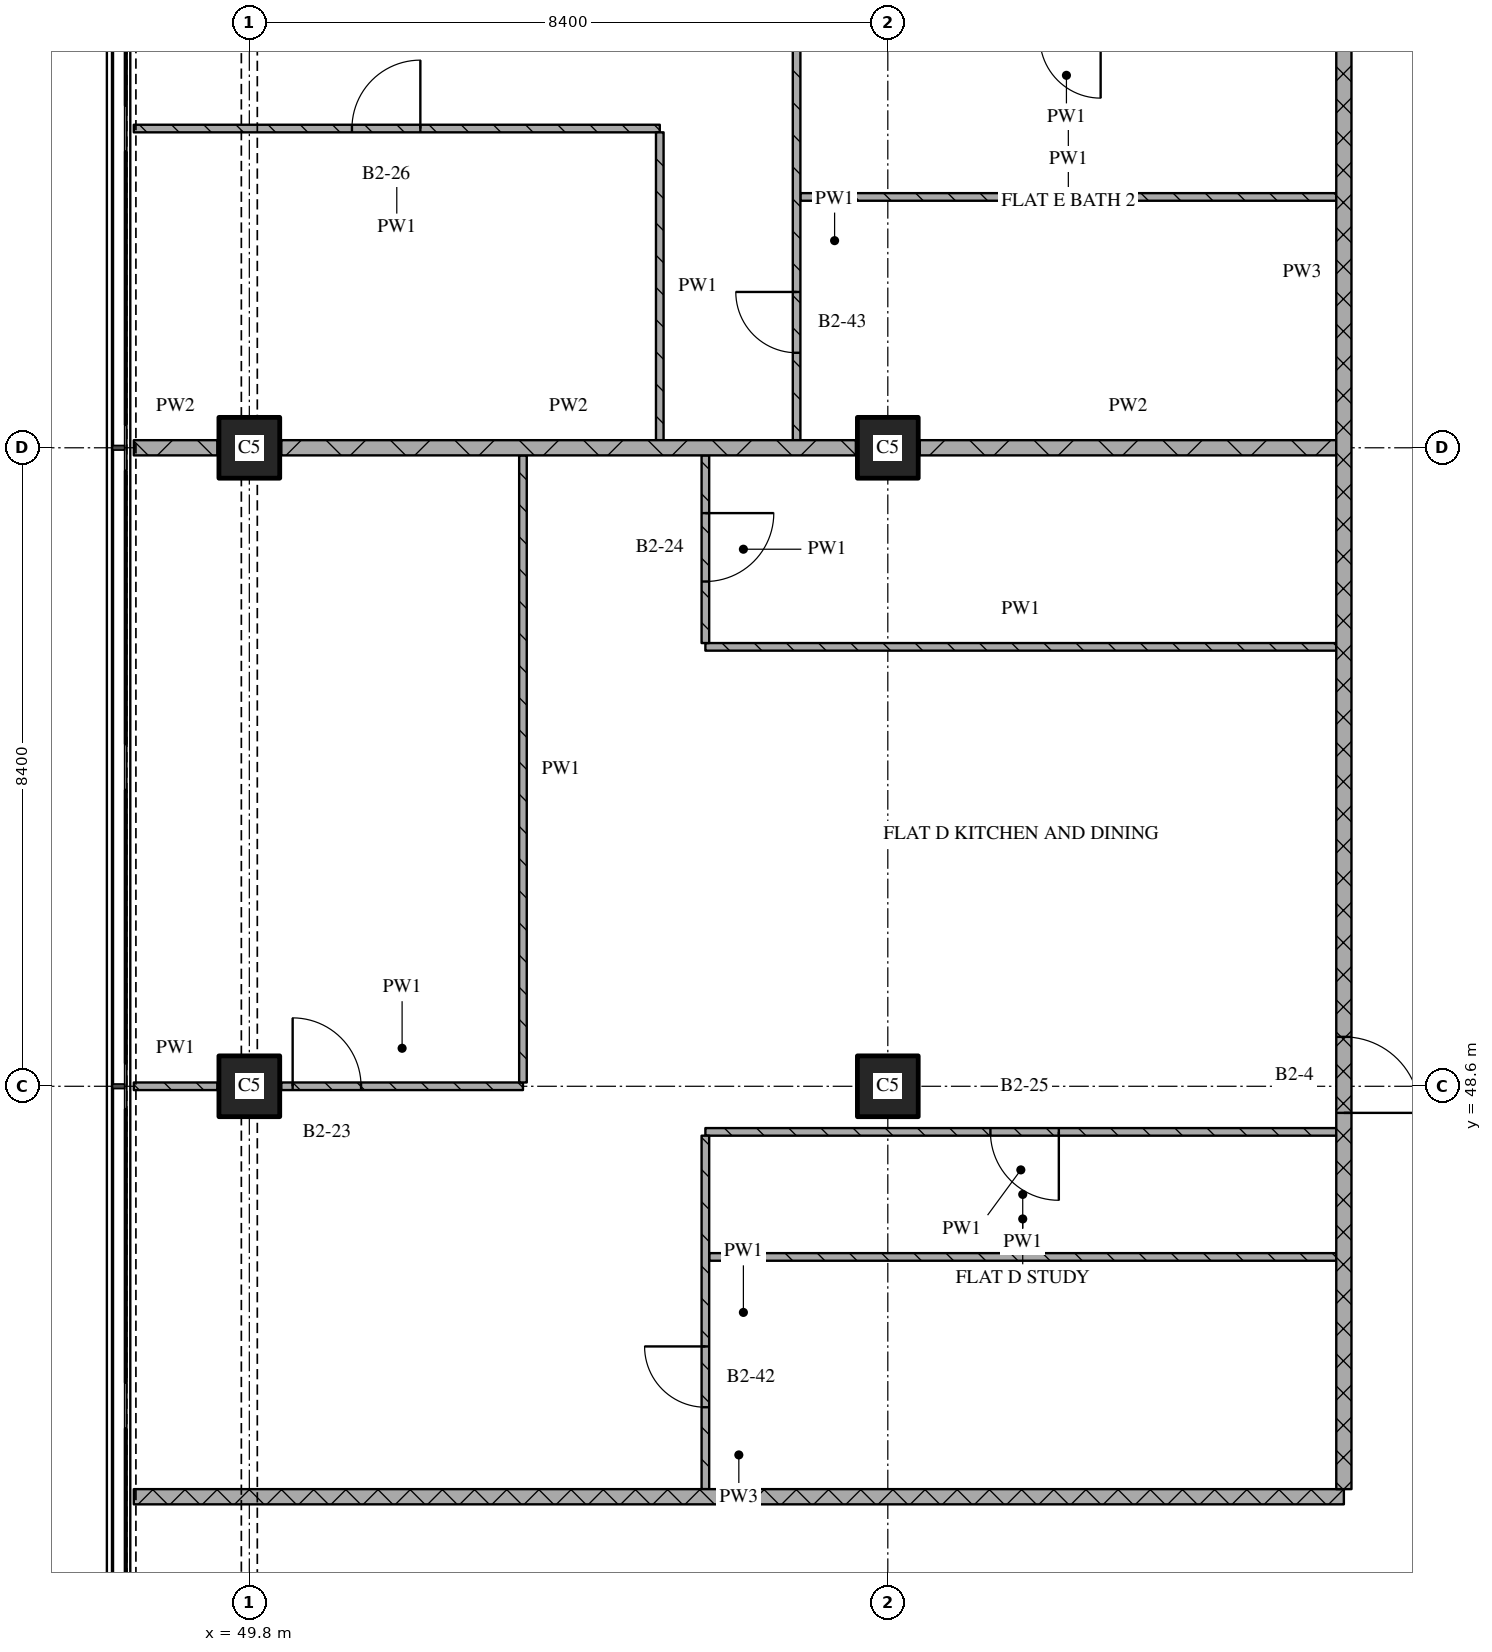
"""IFC4 building model, lengths in metres.
Left out: names, types, materials, properties, quantities, classifications, styles, units other than length and angle.
Written with IfcOpenShell. Run it as: python <this file> out.ifc"""

import sys

from ifc_helpers import new_model, si_unit, direction, frame, frame_2d, origin, origin_2d, place, context, subcontext, project, spatial, rectangle, extrude, element, fill, save


model = new_model("IFC4")
c1 = context("Model", 3, precision=1e-05, world=origin(), true_north=direction((0.0, 1.0)))
c2 = subcontext(c1, "Body", "Model", "MODEL_VIEW")
j1 = project(units=[si_unit("LENGTHUNIT", "METRE"), si_unit("PLANEANGLEUNIT", "RADIAN")], contexts=[c1])
p1 = place(None, origin())
s1 = spatial("IfcSite", under=j1, at=p1, CompositionType="ELEMENT")
p2 = place(p1, origin())
s2 = spatial("IfcBuilding", under=s1, at=p2, CompositionType="ELEMENT")
p3 = place(p2, frame((0.0, 0.0, 109.65)))
s3 = spatial("IfcBuildingStorey", under=s2, at=p3, CompositionType="ELEMENT", Elevation=109.65)
for number, where, z_axis, x_axis in (
    (1, (49.8, 48.6, 0.0), (0.0, 0.0, 1.0), (1.0, 0.0, 0.0)),
    (2, (49.8, 57.0, 0.0), (0.0, 0.0, 1.0), (1.0, 0.0, 0.0)),
    (3, (58.2, 48.6, 0.0), (0.0, 0.0, 1.0), (1.0, 0.0, 0.0)),
    (4, (58.2, 57.0, 0.0), (0.0, 0.0, 1.0), (1.0, 0.0, 0.0)),
):
    element("IfcColumn", number, at=place(p3, frame(where, z_axis=z_axis, x_axis=x_axis)), inside=s3, PredefinedType="COLUMN", context=c2, shape_type="SweptSolid", body=[
        extrude(rectangle(XDim=0.8, YDim=0.8, at=origin_2d()), origin(), (0.0, 0.0, 1.0), 3.6),
    ])
p4 = place(p3, frame((48.28, 43.2, 0.0), z_axis=(0.0, 0.0, 1.0), x_axis=(1.0, 0.0, 0.0)))
e5 = element("IfcWall", 5, at=p4, inside=s3, PredefinedType="PARTITIONING", context=c2, shape_type="SweptSolid", body=[
    extrude(rectangle(XDim=15.92, YDim=0.2, at=frame_2d((7.96, 0.0))), origin(), (0.0, 0.0, 1.0), 3.32),
])
p5 = place(p3, frame((55.85, 46.355, 0.0), z_axis=(0.0, 0.0, 1.0), x_axis=(1.0, 0.0, 0.0)))
e6 = element("IfcWall", 6, at=p5, inside=s3, PredefinedType="PARTITIONING", context=c2, shape_type="SweptSolid", body=[
    extrude(rectangle(XDim=8.25, YDim=0.1, at=frame_2d((4.125, 0.0))), origin(), (0.0, 0.0, 1.0), 3.32),
])
p6 = place(p3, frame((64.1, 48.0, 0.0), z_axis=(0.0, 0.0, 1.0), x_axis=(-1.0, 0.0, 0.0)))
e7 = element("IfcWall", 7, at=p6, inside=s3, PredefinedType="PARTITIONING", context=c2, shape_type="SweptSolid", body=[
    extrude(rectangle(XDim=8.3, YDim=0.1, at=frame_2d((4.15, 0.0))), origin(), (0.0, 0.0, 1.0), 3.32),
])
p7 = place(p6, frame((3.65, 0.0, 0.0)))
e8 = element("IfcOpeningElement", 8, at=p7, cuts=e7, PredefinedType="OPENING", context=c2, shape_type="SweptSolid", body=[
    extrude(rectangle(XDim=0.9, YDim=2.1, at=frame_2d((0.45, 1.05))), frame((0.0, 0.06, 0.0), z_axis=(0.0, -1.0, 0.0), x_axis=(1.0, 0.0, 0.0)), (0.0, 0.0, 1.0), 0.12),
])
p8 = place(p3, frame((48.28, 48.6, 0.0), z_axis=(0.0, 0.0, 1.0), x_axis=(1.0, 0.0, 0.0)))
e9 = element("IfcWall", 9, at=p8, inside=s3, PredefinedType="PARTITIONING", context=c2, shape_type="SweptSolid", body=[
    extrude(rectangle(XDim=1.1, YDim=0.1, at=frame_2d((0.55, 0.0))), origin(), (0.0, 0.0, 1.0), 3.32),
])
p9 = place(p3, frame((50.22, 48.6, 0.0), z_axis=(0.0, 0.0, 1.0), x_axis=(1.0, 0.0, 0.0)))
e10 = element("IfcWall", 10, at=p9, inside=s3, PredefinedType="PARTITIONING", context=c2, shape_type="SweptSolid", body=[
    extrude(rectangle(XDim=3.18, YDim=0.1, at=frame_2d((1.59, 0.0))), origin(), (0.0, 0.0, 1.0), 3.32),
])
p10 = place(p9, frame((0.15, 0.0, 0.0)))
e11 = element("IfcOpeningElement", 11, at=p10, cuts=e10, PredefinedType="OPENING", context=c2, shape_type="SweptSolid", body=[
    extrude(rectangle(XDim=0.9, YDim=2.1, at=frame_2d((0.45, 1.05))), frame((0.0, 0.06, 0.0), z_axis=(0.0, -1.0, 0.0), x_axis=(1.0, 0.0, 0.0)), (0.0, 0.0, 1.0), 0.12),
])
p11 = place(p3, frame((55.8, 54.381, 0.0), z_axis=(0.0, 0.0, 1.0), x_axis=(1.0, 0.0, 0.0)))
e12 = element("IfcWall", 12, at=p11, inside=s3, PredefinedType="PARTITIONING", context=c2, shape_type="SweptSolid", body=[
    extrude(rectangle(XDim=8.3, YDim=0.1, at=frame_2d((4.15, 0.0))), origin(), (0.0, 0.0, 1.0), 3.32),
])
p12 = place(p3, frame((48.28, 57.0, 0.0), z_axis=(0.0, 0.0, 1.0), x_axis=(1.0, 0.0, 0.0)))
e13 = element("IfcWall", 13, at=p12, inside=s3, PredefinedType="PARTITIONING", context=c2, shape_type="SweptSolid", body=[
    extrude(rectangle(XDim=1.1, YDim=0.2, at=frame_2d((0.55, 0.0))), origin(), (0.0, 0.0, 1.0), 3.32),
])
p13 = place(p3, frame((50.22, 57.0, 0.0), z_axis=(0.0, 0.0, 1.0), x_axis=(1.0, 0.0, 0.0)))
e14 = element("IfcWall", 14, at=p13, inside=s3, PredefinedType="PARTITIONING", context=c2, shape_type="SweptSolid", body=[
    extrude(rectangle(XDim=7.56, YDim=0.2, at=frame_2d((3.78, 0.0))), origin(), (0.0, 0.0, 1.0), 3.32),
])
p14 = place(p3, frame((58.62, 57.0, 0.0), z_axis=(0.0, 0.0, 1.0), x_axis=(1.0, 0.0, 0.0)))
e15 = element("IfcWall", 15, at=p14, inside=s3, PredefinedType="PARTITIONING", context=c2, shape_type="SweptSolid", body=[
    extrude(rectangle(XDim=5.48, YDim=0.2, at=frame_2d((2.74, 0.0))), origin(), (0.0, 0.0, 1.0), 3.32),
])
p15 = place(p3, frame((57.05, 60.3, 0.0), z_axis=(0.0, 0.0, 1.0), x_axis=(1.0, 0.0, 0.0)))
e16 = element("IfcWall", 16, at=p15, inside=s3, PredefinedType="PARTITIONING", context=c2, shape_type="SweptSolid", body=[
    extrude(rectangle(XDim=7.05, YDim=0.1, at=frame_2d((3.525, 0.0))), origin(), (0.0, 0.0, 1.0), 3.32),
])
p16 = place(p3, frame((55.2, 61.2, 0.0), z_axis=(0.0, 0.0, 1.0), x_axis=(-1.0, 0.0, 0.0)))
e17 = element("IfcWall", 17, at=p16, inside=s3, PredefinedType="PARTITIONING", context=c2, shape_type="SweptSolid", body=[
    extrude(rectangle(XDim=6.92, YDim=0.1, at=frame_2d((3.46, 0.0))), origin(), (0.0, 0.0, 1.0), 3.32),
])
p17 = place(p16, frame((3.15, 0.0, 0.0)))
e18 = element("IfcOpeningElement", 18, at=p17, cuts=e17, PredefinedType="OPENING", context=c2, shape_type="SweptSolid", body=[
    extrude(rectangle(XDim=0.9, YDim=2.1, at=frame_2d((0.45, 1.05))), frame((0.0, 0.06, 0.0), z_axis=(0.0, -1.0, 0.0), x_axis=(1.0, 0.0, 0.0)), (0.0, 0.0, 1.0), 0.12),
])
p18 = place(p3, frame((53.4, 56.9, 0.0), z_axis=(0.0, 0.0, 1.0), x_axis=(0.0, -1.0, 0.0)))
e19 = element("IfcWall", 19, at=p18, inside=s3, PredefinedType="PARTITIONING", context=c2, shape_type="SweptSolid", body=[
    extrude(rectangle(XDim=8.25, YDim=0.1, at=frame_2d((4.125, 0.0))), origin(), (0.0, 0.0, 1.0), 3.32),
])
p19 = place(p3, frame((55.2, 61.15, 0.0), z_axis=(0.0, 0.0, 1.0), x_axis=(0.0, -1.0, 0.0)))
e20 = element("IfcWall", 20, at=p19, inside=s3, PredefinedType="PARTITIONING", context=c2, shape_type="SweptSolid", body=[
    extrude(rectangle(XDim=4.05, YDim=0.1, at=frame_2d((2.025, 0.0))), origin(), (0.0, 0.0, 1.0), 3.32),
])
p20 = place(p3, frame((55.8, 47.95, 0.0), z_axis=(0.0, 0.0, 1.0), x_axis=(0.0, -1.0, 0.0)))
e21 = element("IfcWall", 21, at=p20, inside=s3, PredefinedType="PARTITIONING", context=c2, shape_type="SweptSolid", body=[
    extrude(rectangle(XDim=4.65, YDim=0.1, at=frame_2d((2.325, 0.0))), origin(), (0.0, 0.0, 1.0), 3.32),
])
p21 = place(p20, frame((2.773, 0.0, 0.0)))
e22 = element("IfcOpeningElement", 22, at=p21, cuts=e21, PredefinedType="OPENING", context=c2, shape_type="SweptSolid", body=[
    extrude(rectangle(XDim=0.8, YDim=2.1, at=frame_2d((0.4, 1.05))), frame((0.0, 0.06, 0.0), z_axis=(0.0, -1.0, 0.0), x_axis=(1.0, 0.0, 0.0)), (0.0, 0.0, 1.0), 0.12),
])
p22 = place(p3, frame((55.8, 56.9, 0.0), z_axis=(0.0, 0.0, 1.0), x_axis=(0.0, -1.0, 0.0)))
e23 = element("IfcWall", 23, at=p22, inside=s3, PredefinedType="PARTITIONING", context=c2, shape_type="SweptSolid", body=[
    extrude(rectangle(XDim=2.469, YDim=0.1, at=frame_2d((1.234, 0.0))), origin(), (0.0, 0.0, 1.0), 3.32),
])
p23 = place(p22, frame((0.76, 0.0, 0.0)))
e24 = element("IfcOpeningElement", 24, at=p23, cuts=e23, PredefinedType="OPENING", context=c2, shape_type="SweptSolid", body=[
    extrude(rectangle(XDim=0.9, YDim=2.1, at=frame_2d((0.45, 1.05))), frame((0.0, 0.06, 0.0), z_axis=(0.0, -1.0, 0.0), x_axis=(1.0, 0.0, 0.0)), (0.0, 0.0, 1.0), 0.12),
])
p24 = place(p3, frame((57.0, 62.35, 0.0), z_axis=(0.0, 0.0, 1.0), x_axis=(0.0, -1.0, 0.0)))
e25 = element("IfcWall", 25, at=p24, inside=s3, PredefinedType="PARTITIONING", context=c2, shape_type="SweptSolid", body=[
    extrude(rectangle(XDim=5.25, YDim=0.1, at=frame_2d((2.625, 0.0))), origin(), (0.0, 0.0, 1.0), 3.32),
])
p25 = place(p24, frame((3.3, 0.0, 0.0)))
e26 = element("IfcOpeningElement", 26, at=p25, cuts=e25, PredefinedType="OPENING", context=c2, shape_type="SweptSolid", body=[
    extrude(rectangle(XDim=0.8, YDim=2.1, at=frame_2d((0.4, 1.05))), frame((0.0, 0.06, 0.0), z_axis=(0.0, -1.0, 0.0), x_axis=(1.0, 0.0, 0.0)), (0.0, 0.0, 1.0), 0.12),
])
p26 = place(p3, frame((64.2, 43.3, 0.0), z_axis=(0.0, 0.0, 1.0), x_axis=(0.0, 1.0, 0.0)))
e27 = element("IfcWall", 27, at=p26, inside=s3, PredefinedType="PARTITIONING", context=c2, shape_type="SweptSolid", body=[
    extrude(rectangle(XDim=32.02, YDim=0.2, at=frame_2d((16.01, 0.0))), origin(), (0.0, 0.0, 1.0), 3.32),
])
p27 = place(p26, frame((4.95, 0.0, 0.0)))
e28 = element("IfcOpeningElement", 28, at=p27, cuts=e27, PredefinedType="OPENING", context=c2, shape_type="SweptSolid", body=[
    extrude(rectangle(XDim=1.0, YDim=2.1, at=frame_2d((0.5, 1.05))), frame((0.0, 0.11, 0.0), z_axis=(0.0, -1.0, 0.0), x_axis=(1.0, 0.0, 0.0)), (0.0, 0.0, 1.0), 0.22),
])
p28 = place(p26, frame((19.35, 0.0, 0.0)))
e29 = element("IfcOpeningElement", 29, at=p28, cuts=e27, PredefinedType="OPENING", context=c2, shape_type="SweptSolid", body=[
    extrude(rectangle(XDim=1.0, YDim=2.1, at=frame_2d((0.5, 1.05))), frame((0.0, 0.11, 0.0), z_axis=(0.0, -1.0, 0.0), x_axis=(1.0, 0.0, 0.0)), (0.0, 0.0, 1.0), 0.22),
])
p29 = place(p7, origin())
e30 = element("IfcDoor", 30, at=p29, inside=s3, OperationType="SINGLE_SWING_LEFT", PredefinedType="DOOR", context=c2, shape_type="SweptSolid", body=[
    extrude(rectangle(XDim=0.9, YDim=2.1, at=frame_2d((0.45, 1.05))), frame((0.0, 0.025, 0.0), z_axis=(0.0, -1.0, 0.0), x_axis=(1.0, 0.0, 0.0)), (0.0, 0.0, 1.0), 0.05),
])
fill(e8, e30)
p30 = place(p10, origin())
e31 = element("IfcDoor", 31, at=p30, inside=s3, OperationType="SINGLE_SWING_LEFT", PredefinedType="DOOR", context=c2, shape_type="SweptSolid", body=[
    extrude(rectangle(XDim=0.9, YDim=2.1, at=frame_2d((0.45, 1.05))), frame((0.0, 0.025, 0.0), z_axis=(0.0, -1.0, 0.0), x_axis=(1.0, 0.0, 0.0)), (0.0, 0.0, 1.0), 0.05),
])
fill(e11, e31)
p31 = place(p17, origin())
e32 = element("IfcDoor", 32, at=p31, inside=s3, OperationType="SINGLE_SWING_RIGHT", PredefinedType="DOOR", context=c2, shape_type="SweptSolid", body=[
    extrude(rectangle(XDim=0.9, YDim=2.1, at=frame_2d((0.45, 1.05))), frame((0.0, 0.025, 0.0), z_axis=(0.0, -1.0, 0.0), x_axis=(1.0, 0.0, 0.0)), (0.0, 0.0, 1.0), 0.05),
])
fill(e18, e32)
p32 = place(p21, origin())
e33 = element("IfcDoor", 33, at=p32, inside=s3, OperationType="SINGLE_SWING_RIGHT", PredefinedType="DOOR", context=c2, shape_type="SweptSolid", body=[
    extrude(rectangle(XDim=0.8, YDim=2.1, at=frame_2d((0.4, 1.05))), frame((0.0, 0.025, 0.0), z_axis=(0.0, -1.0, 0.0), x_axis=(1.0, 0.0, 0.0)), (0.0, 0.0, 1.0), 0.05),
])
fill(e22, e33)
p33 = place(p23, origin())
e34 = element("IfcDoor", 34, at=p33, inside=s3, OperationType="SINGLE_SWING_LEFT", PredefinedType="DOOR", context=c2, shape_type="SweptSolid", body=[
    extrude(rectangle(XDim=0.9, YDim=2.1, at=frame_2d((0.45, 1.05))), frame((0.0, 0.025, 0.0), z_axis=(0.0, -1.0, 0.0), x_axis=(1.0, 0.0, 0.0)), (0.0, 0.0, 1.0), 0.05),
])
fill(e24, e34)
p34 = place(p25, origin())
e35 = element("IfcDoor", 35, at=p34, inside=s3, OperationType="SINGLE_SWING_RIGHT", PredefinedType="DOOR", context=c2, shape_type="SweptSolid", body=[
    extrude(rectangle(XDim=0.8, YDim=2.1, at=frame_2d((0.4, 1.05))), frame((0.0, 0.025, 0.0), z_axis=(0.0, -1.0, 0.0), x_axis=(1.0, 0.0, 0.0)), (0.0, 0.0, 1.0), 0.05),
])
fill(e26, e35)
p35 = place(p27, origin())
e36 = element("IfcDoor", 36, at=p35, inside=s3, OperationType="SINGLE_SWING_RIGHT", PredefinedType="DOOR", context=c2, shape_type="SweptSolid", body=[
    extrude(rectangle(XDim=1.0, YDim=2.1, at=frame_2d((0.5, 1.05))), frame((0.0, 0.025, 0.0), z_axis=(0.0, -1.0, 0.0), x_axis=(1.0, 0.0, 0.0)), (0.0, 0.0, 1.0), 0.05),
])
fill(e28, e36)
save(model, sys.argv[1])
